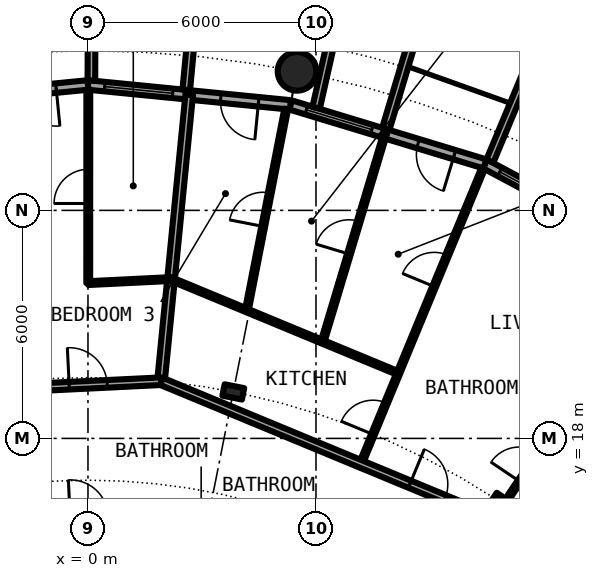
"""IFC4 building model, lengths in metres.
Left out: names, types, materials, properties, quantities, classifications, styles, units other than length and angle.
Written with IfcOpenShell. Run it as: python <this file> out.ifc"""

import sys

from ifc_helpers import new_model, si_unit, direction, frame, frame_2d, origin, origin_2d, place, context, subcontext, project, spatial, rectangle, hollow_circle, i_section, extrude, element, fill, save


model = new_model("IFC4")
c1 = context("Model", 3, precision=1e-05, world=origin(), true_north=direction((0.0, 1.0)))
c2 = subcontext(c1, "Body", "Model", "MODEL_VIEW")
j1 = project(units=[si_unit("LENGTHUNIT", "METRE"), si_unit("PLANEANGLEUNIT", "RADIAN")], contexts=[c1])
p1 = place(None, origin())
s1 = spatial("IfcSite", under=j1, at=p1, CompositionType="ELEMENT")
p2 = place(p1, origin())
s2 = spatial("IfcBuilding", under=s1, at=p2, CompositionType="ELEMENT")
p3 = place(p2, frame((0.0, 0.0, 69.7)))
s3 = spatial("IfcBuildingStorey", under=s2, at=p3, CompositionType="ELEMENT", Elevation=69.7)
p4 = place(p3, frame((5.501, 27.658, 0.0), z_axis=(0.0, 0.0, 1.0), x_axis=(1.0, 0.0, 0.0)))
e1 = element("IfcColumn", 1, at=p4, inside=s3, PredefinedType="COLUMN", context=c2, shape_type="SweptSolid", body=[
    extrude(hollow_circle(Radius=0.508, WallThickness=0.04, at=origin_2d()), origin(), (0.0, 0.0, 1.0), 3.05),
])
for number, where, z_axis, x_axis in (
    (2, (10.889, 16.297, 0.0), (0.0, 0.0, 1.0), (0.556, 0.831, 0.0)),
    (3, (3.824, 19.223, 0.0), (0.0, 0.0, 1.0), (0.195, 0.981, 0.0)),
):
    element("IfcColumn", number, at=place(p3, frame(where, z_axis=z_axis, x_axis=x_axis)), inside=s3, PredefinedType="COLUMN", context=c2, shape_type="SweptSolid", body=[
        extrude(i_section(OverallWidth=0.306, OverallDepth=0.524, WebThickness=0.021, FlangeThickness=0.04, FilletRadius=0.027, at=origin_2d()), origin(), (0.0, 0.0, 1.0), 3.05),
    ])
p5 = place(p3, frame((15.167, 22.699, 0.0), z_axis=(0.0, 0.0, 1.0), x_axis=(-0.881915646801, 0.471407246368, 0.0)))
e4 = element("IfcWall", 4, at=p5, inside=s3, PredefinedType="SOLIDWALL", context=c2, shape_type="SweptSolid", body=[
    extrude(rectangle(XDim=5.352, YDim=0.25, at=frame_2d((2.676, 0.0))), origin(), (0.0, 0.0, 1.0), 2.7),
])
p6 = place(p5, frame((0.841, 0.0, 0.0)))
e5 = element("IfcOpeningElement", 5, at=p6, cuts=e4, PredefinedType="OPENING", context=c2, shape_type="SweptSolid", body=[
    extrude(rectangle(XDim=1.0, YDim=2.2, at=frame_2d((0.5, 1.1))), frame((0.0, 0.135, 0.0), z_axis=(0.0, -1.0, 0.0), x_axis=(1.0, 0.0, 0.0)), (0.0, 0.0, 1.0), 0.27),
])
p7 = place(p5, frame((3.111, 0.0, 0.3)))
e6 = element("IfcOpeningElement", 6, at=p7, cuts=e4, PredefinedType="OPENING", context=c2, shape_type="SweptSolid", body=[
    extrude(rectangle(XDim=1.8, YDim=2.1, at=frame_2d((0.9, 1.05))), frame((0.0, 0.135, 0.0), z_axis=(0.0, -1.0, 0.0), x_axis=(1.0, 0.0, 0.0)), (0.0, 0.0, 1.0), 0.27),
])
p8 = place(p3, frame((10.575, 25.295, -0.03), z_axis=(0.0, 0.0, 1.0), x_axis=(0.385697364644, 0.922625353492, 0.0)))
e7 = element("IfcWall", 7, at=p8, inside=s3, PredefinedType="SOLIDWALL", context=c2, shape_type="SweptSolid", body=[
    extrude(rectangle(XDim=2.883, YDim=0.2, at=frame_2d((1.442, 0.0))), origin(), (0.0, 0.0, 1.0), 2.73),
])
p9 = place(p3, frame((10.447, 25.222, 0.0), z_axis=(0.0, 0.0, 1.0), x_axis=(-0.956965678721, 0.290201119486, 0.0)))
e8 = element("IfcWall", 8, at=p9, inside=s3, PredefinedType="SOLIDWALL", context=c2, shape_type="SweptSolid", body=[
    extrude(rectangle(XDim=5.351, YDim=0.25, at=frame_2d((2.676, 0.0))), origin(), (0.0, 0.0, 1.0), 2.7),
])
p10 = place(p9, frame((0.841, 0.0, 0.0)))
e9 = element("IfcOpeningElement", 9, at=p10, cuts=e8, PredefinedType="OPENING", context=c2, shape_type="SweptSolid", body=[
    extrude(rectangle(XDim=1.0, YDim=2.2, at=frame_2d((0.5, 1.1))), frame((0.0, 0.135, 0.0), z_axis=(0.0, -1.0, 0.0), x_axis=(1.0, 0.0, 0.0)), (0.0, 0.0, 1.0), 0.27),
])
p11 = place(p9, frame((3.111, 0.0, 0.3)))
e10 = element("IfcOpeningElement", 10, at=p11, cuts=e8, PredefinedType="OPENING", context=c2, shape_type="SweptSolid", body=[
    extrude(rectangle(XDim=1.8, YDim=2.1, at=frame_2d((0.9, 1.05))), frame((0.0, 0.135, 0.0), z_axis=(0.0, -1.0, 0.0), x_axis=(1.0, 0.0, 0.0)), (0.0, 0.0, 1.0), 0.27),
])
p12 = place(p3, frame((7.837, 26.144, -0.03), z_axis=(0.0, 0.0, 1.0), x_axis=(0.287064767992, 0.957911174889, 0.0)))
e11 = element("IfcWall", 11, at=p12, inside=s3, PredefinedType="SOLIDWALL", context=c2, shape_type="SweptSolid", body=[
    extrude(rectangle(XDim=3.006, YDim=0.2, at=frame_2d((1.503, 0.0))), origin(), (0.0, 0.0, 1.0), 2.73),
])
p13 = place(p3, frame((6.004, 26.7, -0.03), z_axis=(0.0, 0.0, 1.0), x_axis=(0.219609259383, 0.975587911566, 0.0)))
e12 = element("IfcWall", 12, at=p13, inside=s3, PredefinedType="SOLIDWALL", context=c2, shape_type="SweptSolid", body=[
    extrude(rectangle(XDim=2.933, YDim=0.2, at=frame_2d((1.466, 0.0))), origin(), (0.0, 0.0, 1.0), 2.73),
])
p14 = place(p3, frame((5.326, 26.775, 0.0), z_axis=(0.0, 0.0, 1.0), x_axis=(-0.995173996315, 0.098126026407, 0.0)))
e13 = element("IfcWall", 13, at=p14, inside=s3, PredefinedType="SOLIDWALL", context=c2, shape_type="SweptSolid", body=[
    extrude(rectangle(XDim=5.352, YDim=0.25, at=frame_2d((2.676, 0.0))), origin(), (0.0, 0.0, 1.0), 2.7),
])
p15 = place(p14, frame((0.841, 0.0, 0.0)))
e14 = element("IfcOpeningElement", 14, at=p15, cuts=e13, PredefinedType="OPENING", context=c2, shape_type="SweptSolid", body=[
    extrude(rectangle(XDim=1.0, YDim=2.2, at=frame_2d((0.5, 1.1))), frame((0.0, 0.135, 0.0), z_axis=(0.0, -1.0, 0.0), x_axis=(1.0, 0.0, 0.0)), (0.0, 0.0, 1.0), 0.27),
])
p16 = place(p14, frame((3.111, 0.0, 0.3)))
e15 = element("IfcOpeningElement", 15, at=p16, cuts=e13, PredefinedType="OPENING", context=c2, shape_type="SweptSolid", body=[
    extrude(rectangle(XDim=1.8, YDim=2.1, at=frame_2d((0.9, 1.05))), frame((0.0, 0.135, 0.0), z_axis=(0.0, -1.0, 0.0), x_axis=(1.0, 0.0, 0.0)), (0.0, 0.0, 1.0), 0.27),
])
p17 = place(p3, frame((2.586, 27.171, -0.03), z_axis=(0.0, 0.0, 1.0), x_axis=(0.094548432284, 0.995520262954, 0.0)))
e16 = element("IfcWall", 16, at=p17, inside=s3, PredefinedType="SOLIDWALL", context=c2, shape_type="SweptSolid", body=[
    extrude(rectangle(XDim=3.006, YDim=0.2, at=frame_2d((1.503, 0.0))), origin(), (0.0, 0.0, 1.0), 2.73),
])
p18 = place(p3, frame((0.09, 27.417, -0.03), z_axis=(0.0, 0.0, 1.0), x_axis=(0.00347308367, 0.999993968827, 0.0)))
e17 = element("IfcWall", 17, at=p18, inside=s3, PredefinedType="SOLIDWALL", context=c2, shape_type="SweptSolid", body=[
    extrude(rectangle(XDim=2.882, YDim=0.2, at=frame_2d((1.441, 0.0))), origin(), (0.0, 0.0, 1.0), 2.73),
])
p19 = place(p3, frame((0.0, 27.3, 0.0), z_axis=(0.0, 0.0, 1.0), x_axis=(-0.995173996315, -0.098126026407, 0.0)))
e18 = element("IfcWall", 18, at=p19, inside=s3, PredefinedType="SOLIDWALL", context=c2, shape_type="SweptSolid", body=[
    extrude(rectangle(XDim=5.352, YDim=0.25, at=frame_2d((2.676, 0.0))), origin(), (0.0, 0.0, 1.0), 2.7),
])
p20 = place(p19, frame((0.841, 0.0, 0.0)))
e19 = element("IfcOpeningElement", 19, at=p20, cuts=e18, PredefinedType="OPENING", context=c2, shape_type="SweptSolid", body=[
    extrude(rectangle(XDim=1.0, YDim=2.2, at=frame_2d((0.5, 1.1))), frame((0.0, 0.135, 0.0), z_axis=(0.0, -1.0, 0.0), x_axis=(1.0, 0.0, 0.0)), (0.0, 0.0, 1.0), 0.27),
])
p21 = place(p19, frame((3.111, 0.0, 0.3)))
e20 = element("IfcOpeningElement", 20, at=p21, cuts=e18, PredefinedType="OPENING", context=c2, shape_type="SweptSolid", body=[
    extrude(rectangle(XDim=1.8, YDim=2.1, at=frame_2d((0.9, 1.05))), frame((0.0, 0.135, 0.0), z_axis=(0.0, -1.0, 0.0), x_axis=(1.0, 0.0, 0.0)), (0.0, 0.0, 1.0), 0.27),
])
p22 = place(p3, frame((7.178, 17.328, 0.0), z_axis=(0.0, 0.0, 1.0), x_axis=(0.382458509789, 0.923972666419, 0.0)))
e21 = element("IfcWall", 21, at=p22, inside=s3, PredefinedType="PARTITIONING", context=c2, shape_type="SweptSolid", body=[
    extrude(rectangle(XDim=8.419, YDim=0.1, at=frame_2d((4.209, 0.0))), origin(), (0.0, 0.0, 1.0), 2.7),
])
p23 = place(p22, frame((0.841, 0.0, 0.0)))
e22 = element("IfcOpeningElement", 22, at=p23, cuts=e21, PredefinedType="OPENING", context=c2, shape_type="SweptSolid", body=[
    extrude(rectangle(XDim=0.9, YDim=2.3, at=frame_2d((0.45, 1.15))), frame((0.0, 0.06, 0.0), z_axis=(0.0, -1.0, 0.0), x_axis=(1.0, 0.0, 0.0)), (0.0, 0.0, 1.0), 0.12),
])
p24 = place(p22, frame((5.051, 0.0, 0.0)))
e23 = element("IfcOpeningElement", 23, at=p24, cuts=e21, PredefinedType="OPENING", context=c2, shape_type="SweptSolid", body=[
    extrude(rectangle(XDim=0.9, YDim=2.3, at=frame_2d((0.45, 1.15))), frame((0.0, 0.06, 0.0), z_axis=(0.0, -1.0, 0.0), x_axis=(1.0, 0.0, 0.0)), (0.0, 0.0, 1.0), 0.12),
])
p25 = place(p3, frame((0.007, 22.086, 0.0), z_axis=(0.0, 0.0, 1.0), x_axis=(0.000383785052, 0.999999926355, 0.0)))
e24 = element("IfcWall", 24, at=p25, inside=s3, PredefinedType="PARTITIONING", context=c2, shape_type="SweptSolid", body=[
    extrude(rectangle(XDim=5.089, YDim=0.1, at=frame_2d((2.544, 0.0))), origin(), (0.0, 0.0, 1.0), 2.7),
])
p26 = place(p25, frame((2.095, 0.0, 0.0)))
e25 = element("IfcOpeningElement", 25, at=p26, cuts=e24, PredefinedType="OPENING", context=c2, shape_type="SweptSolid", body=[
    extrude(rectangle(XDim=0.9, YDim=2.3, at=frame_2d((0.45, 1.15))), frame((0.0, 0.06, 0.0), z_axis=(0.0, -1.0, 0.0), x_axis=(1.0, 0.0, 0.0)), (0.0, 0.0, 1.0), 0.12),
])
p27 = place(p3, frame((1.921, 19.506, 0.0), z_axis=(0.0, 0.0, 1.0), x_axis=(0.098115395479, 0.995175044487, 0.0)))
e26 = element("IfcWall", 26, at=p27, inside=s3, PredefinedType="PARTITIONING", context=c2, shape_type="SweptSolid", body=[
    extrude(rectangle(XDim=7.574, YDim=0.2, at=frame_2d((3.787, 0.0))), origin(), (0.0, 0.0, 1.0), 2.7),
])
p28 = place(p3, frame((4.179, 21.367, 0.0), z_axis=(0.0, 0.0, 1.0), x_axis=(0.192109041462, 0.981373586453, 0.0)))
e27 = element("IfcWall", 27, at=p28, inside=s3, PredefinedType="PARTITIONING", context=c2, shape_type="SweptSolid", body=[
    extrude(rectangle(XDim=5.404, YDim=0.1, at=frame_2d((2.702, 0.0))), origin(), (0.0, 0.0, 1.0), 2.7),
])
p29 = place(p28, frame((2.252, 0.0, 0.0)))
e28 = element("IfcOpeningElement", 28, at=p29, cuts=e27, PredefinedType="OPENING", context=c2, shape_type="SweptSolid", body=[
    extrude(rectangle(XDim=0.9, YDim=2.3, at=frame_2d((0.45, 1.15))), frame((0.0, 0.06, 0.0), z_axis=(0.0, -1.0, 0.0), x_axis=(1.0, 0.0, 0.0)), (0.0, 0.0, 1.0), 0.12),
])
p30 = place(p3, frame((6.173, 20.541, 0.0), z_axis=(0.0, 0.0, 1.0), x_axis=(0.287793773423, 0.957692405723, 0.0)))
e29 = element("IfcWall", 29, at=p30, inside=s3, PredefinedType="PARTITIONING", context=c2, shape_type="SweptSolid", body=[
    extrude(rectangle(XDim=5.726, YDim=0.1, at=frame_2d((2.863, 0.0))), origin(), (0.0, 0.0, 1.0), 2.7),
])
p31 = place(p30, frame((2.413, 0.0, 0.0)))
e30 = element("IfcOpeningElement", 30, at=p31, cuts=e29, PredefinedType="OPENING", context=c2, shape_type="SweptSolid", body=[
    extrude(rectangle(XDim=0.9, YDim=2.3, at=frame_2d((0.45, 1.15))), frame((0.0, 0.06, 0.0), z_axis=(0.0, -1.0, 0.0), x_axis=(1.0, 0.0, 0.0)), (0.0, 0.0, 1.0), 0.12),
])
p32 = place(p3, frame((11.087, 16.48, 0.0), z_axis=(0.0, 0.0, 1.0), x_axis=(0.558383137663, 0.829583191472, 0.0)))
e31 = element("IfcWall", 31, at=p32, inside=s3, PredefinedType="PARTITIONING", context=c2, shape_type="SweptSolid", body=[
    extrude(rectangle(XDim=1.909, YDim=0.1, at=frame_2d((0.955, 0.0))), origin(), (0.0, 0.0, 1.0), 2.7),
])
p33 = place(p32, frame((0.474, 0.0, 0.0)))
e32 = element("IfcOpeningElement", 32, at=p33, cuts=e31, PredefinedType="OPENING", context=c2, shape_type="SweptSolid", body=[
    extrude(rectangle(XDim=0.9, YDim=2.3, at=frame_2d((0.45, 1.15))), frame((0.0, 0.06, 0.0), z_axis=(0.0, -1.0, 0.0), x_axis=(1.0, 0.0, 0.0)), (0.0, 0.0, 1.0), 0.12),
])
p34 = place(p3, frame((1.921, 19.506, 0.0), z_axis=(0.0, 0.0, 1.0), x_axis=(0.923845560554, -0.38276543763, 0.0)))
e33 = element("IfcWall", 33, at=p34, inside=s3, PredefinedType="PARTITIONING", context=c2, shape_type="SweptSolid", body=[
    extrude(rectangle(XDim=11.381, YDim=0.2, at=frame_2d((5.69, 0.0))), origin(), (0.0, 0.0, 1.0), 2.7),
])
p35 = place(p34, frame((7.087, 0.0, 0.0)))
e34 = element("IfcOpeningElement", 34, at=p35, cuts=e33, PredefinedType="OPENING", context=c2, shape_type="SweptSolid", body=[
    extrude(rectangle(XDim=1.0, YDim=2.3, at=frame_2d((0.5, 1.15))), frame((0.0, 0.11, 0.0), z_axis=(0.0, -1.0, 0.0), x_axis=(1.0, 0.0, 0.0)), (0.0, 0.0, 1.0), 0.22),
])
p36 = place(p3, frame((-3.669, 19.231, 0.0), z_axis=(0.0, 0.0, 1.0), x_axis=(0.998803644396, 0.048900715146, 0.0)))
e35 = element("IfcWall", 35, at=p36, inside=s3, PredefinedType="PARTITIONING", context=c2, shape_type="SweptSolid", body=[
    extrude(rectangle(XDim=5.602, YDim=0.2, at=frame_2d((2.801, 0.0))), origin(), (0.0, 0.0, 1.0), 2.38),
])
p37 = place(p36, frame((3.179, 0.0, 0.0)))
e36 = element("IfcOpeningElement", 36, at=p37, cuts=e35, PredefinedType="OPENING", context=c2, shape_type="SweptSolid", body=[
    extrude(rectangle(XDim=1.0, YDim=2.3, at=frame_2d((0.5, 1.15))), frame((0.0, 0.11, 0.0), z_axis=(0.0, -1.0, 0.0), x_axis=(1.0, 0.0, 0.0)), (0.0, 0.0, 1.0), 0.22),
])
p38 = place(p3, frame((2.185, 22.193, 0.0), z_axis=(0.0, 0.0, 1.0), x_axis=(0.923844914631, -0.382766996632, 0.0)))
e37 = element("IfcWall", 37, at=p38, inside=s3, PredefinedType="PARTITIONING", context=c2, shape_type="SweptSolid", body=[
    extrude(rectangle(XDim=6.474, YDim=0.1, at=frame_2d((3.237, 0.0))), origin(), (0.0, 0.0, 1.0), 2.7),
])
p39 = place(p3, frame((0.007, 22.086, 0.0), z_axis=(0.0, 0.0, 1.0), x_axis=(0.998792477005, 0.049128279821, 0.0)))
e38 = element("IfcWall", 38, at=p39, inside=s3, PredefinedType="PARTITIONING", context=c2, shape_type="SweptSolid", body=[
    extrude(rectangle(XDim=2.182, YDim=0.1, at=frame_2d((1.091, 0.0))), origin(), (0.0, 0.0, 1.0), 2.7),
])
p40 = place(p7, origin())
e39 = element("IfcWindow", 39, at=p40, inside=s3, PartitioningType="SINGLE_PANEL", PredefinedType="WINDOW", context=c2, shape_type="SweptSolid", body=[
    extrude(rectangle(XDim=1.8, YDim=2.1, at=frame_2d((0.9, 1.05))), frame((0.0, 0.03, 0.0), z_axis=(0.0, -1.0, 0.0), x_axis=(1.0, 0.0, 0.0)), (0.0, 0.0, 1.0), 0.06),
])
fill(e6, e39)
p41 = place(p10, origin())
e40 = element("IfcDoor", 40, at=p41, inside=s3, OperationType="SINGLE_SWING_LEFT", PredefinedType="DOOR", context=c2, shape_type="SweptSolid", body=[
    extrude(rectangle(XDim=1.0, YDim=2.2, at=frame_2d((0.5, 1.1))), frame((0.0, 0.025, 0.0), z_axis=(0.0, -1.0, 0.0), x_axis=(1.0, 0.0, 0.0)), (0.0, 0.0, 1.0), 0.05),
])
fill(e9, e40)
p42 = place(p11, origin())
e41 = element("IfcWindow", 41, at=p42, inside=s3, PartitioningType="SINGLE_PANEL", PredefinedType="WINDOW", context=c2, shape_type="SweptSolid", body=[
    extrude(rectangle(XDim=1.8, YDim=2.1, at=frame_2d((0.9, 1.05))), frame((0.0, 0.03, 0.0), z_axis=(0.0, -1.0, 0.0), x_axis=(1.0, 0.0, 0.0)), (0.0, 0.0, 1.0), 0.06),
])
fill(e10, e41)
p43 = place(p15, origin())
e42 = element("IfcDoor", 42, at=p43, inside=s3, OperationType="SINGLE_SWING_LEFT", PredefinedType="DOOR", context=c2, shape_type="SweptSolid", body=[
    extrude(rectangle(XDim=1.0, YDim=2.2, at=frame_2d((0.5, 1.1))), frame((0.0, 0.025, 0.0), z_axis=(0.0, -1.0, 0.0), x_axis=(1.0, 0.0, 0.0)), (0.0, 0.0, 1.0), 0.05),
])
fill(e14, e42)
p44 = place(p16, origin())
e43 = element("IfcWindow", 43, at=p44, inside=s3, PartitioningType="SINGLE_PANEL", PredefinedType="WINDOW", context=c2, shape_type="SweptSolid", body=[
    extrude(rectangle(XDim=1.8, YDim=2.1, at=frame_2d((0.9, 1.05))), frame((0.0, 0.03, 0.0), z_axis=(0.0, -1.0, 0.0), x_axis=(1.0, 0.0, 0.0)), (0.0, 0.0, 1.0), 0.06),
])
fill(e15, e43)
p45 = place(p20, origin())
e44 = element("IfcDoor", 44, at=p45, inside=s3, OperationType="SINGLE_SWING_LEFT", PredefinedType="DOOR", context=c2, shape_type="SweptSolid", body=[
    extrude(rectangle(XDim=1.0, YDim=2.2, at=frame_2d((0.5, 1.1))), frame((0.0, 0.025, 0.0), z_axis=(0.0, -1.0, 0.0), x_axis=(1.0, 0.0, 0.0)), (0.0, 0.0, 1.0), 0.05),
])
fill(e19, e44)
p46 = place(p35, origin())
e45 = element("IfcDoor", 45, at=p46, inside=s3, OperationType="SINGLE_SWING_RIGHT", PredefinedType="DOOR", context=c2, shape_type="SweptSolid", body=[
    extrude(rectangle(XDim=1.0, YDim=2.3, at=frame_2d((0.5, 1.15))), frame((0.0, 0.025, 0.0), z_axis=(0.0, -1.0, 0.0), x_axis=(1.0, 0.0, 0.0)), (0.0, 0.0, 1.0), 0.05),
])
fill(e34, e45)
p47 = place(p33, origin())
e46 = element("IfcDoor", 46, at=p47, inside=s3, OperationType="SINGLE_SWING_LEFT", PredefinedType="DOOR", context=c2, shape_type="SweptSolid", body=[
    extrude(rectangle(XDim=0.9, YDim=2.3, at=frame_2d((0.45, 1.15))), frame((0.0, 0.025, 0.0), z_axis=(0.0, -1.0, 0.0), x_axis=(1.0, 0.0, 0.0)), (0.0, 0.0, 1.0), 0.05),
])
fill(e32, e46)
p48 = place(p23, origin())
e47 = element("IfcDoor", 47, at=p48, inside=s3, OperationType="SINGLE_SWING_LEFT", PredefinedType="DOOR", context=c2, shape_type="SweptSolid", body=[
    extrude(rectangle(XDim=0.9, YDim=2.3, at=frame_2d((0.45, 1.15))), frame((0.0, 0.025, 0.0), z_axis=(0.0, -1.0, 0.0), x_axis=(1.0, 0.0, 0.0)), (0.0, 0.0, 1.0), 0.05),
])
fill(e22, e47)
p49 = place(p24, origin())
e48 = element("IfcDoor", 48, at=p49, inside=s3, OperationType="SINGLE_SWING_RIGHT", PredefinedType="DOOR", context=c2, shape_type="SweptSolid", body=[
    extrude(rectangle(XDim=0.9, YDim=2.3, at=frame_2d((0.45, 1.15))), frame((0.0, 0.025, 0.0), z_axis=(0.0, -1.0, 0.0), x_axis=(1.0, 0.0, 0.0)), (0.0, 0.0, 1.0), 0.05),
])
fill(e23, e48)
p50 = place(p31, origin())
e49 = element("IfcDoor", 49, at=p50, inside=s3, OperationType="SINGLE_SWING_RIGHT", PredefinedType="DOOR", context=c2, shape_type="SweptSolid", body=[
    extrude(rectangle(XDim=0.9, YDim=2.3, at=frame_2d((0.45, 1.15))), frame((0.0, 0.025, 0.0), z_axis=(0.0, -1.0, 0.0), x_axis=(1.0, 0.0, 0.0)), (0.0, 0.0, 1.0), 0.05),
])
fill(e30, e49)
p51 = place(p29, origin())
e50 = element("IfcDoor", 50, at=p51, inside=s3, OperationType="SINGLE_SWING_RIGHT", PredefinedType="DOOR", context=c2, shape_type="SweptSolid", body=[
    extrude(rectangle(XDim=0.9, YDim=2.3, at=frame_2d((0.45, 1.15))), frame((0.0, 0.025, 0.0), z_axis=(0.0, -1.0, 0.0), x_axis=(1.0, 0.0, 0.0)), (0.0, 0.0, 1.0), 0.05),
])
fill(e28, e50)
p52 = place(p37, origin())
e51 = element("IfcDoor", 51, at=p52, inside=s3, OperationType="SINGLE_SWING_RIGHT", PredefinedType="DOOR", context=c2, shape_type="SweptSolid", body=[
    extrude(rectangle(XDim=1.0, YDim=2.3, at=frame_2d((0.5, 1.15))), frame((0.0, 0.025, 0.0), z_axis=(0.0, -1.0, 0.0), x_axis=(1.0, 0.0, 0.0)), (0.0, 0.0, 1.0), 0.05),
])
fill(e36, e51)
p53 = place(p26, origin())
e52 = element("IfcDoor", 52, at=p53, inside=s3, OperationType="SINGLE_SWING_RIGHT", PredefinedType="DOOR", context=c2, shape_type="SweptSolid", body=[
    extrude(rectangle(XDim=0.9, YDim=2.3, at=frame_2d((0.45, 1.15))), frame((0.0, 0.025, 0.0), z_axis=(0.0, -1.0, 0.0), x_axis=(1.0, 0.0, 0.0)), (0.0, 0.0, 1.0), 0.05),
])
fill(e25, e52)
save(model, sys.argv[1])
